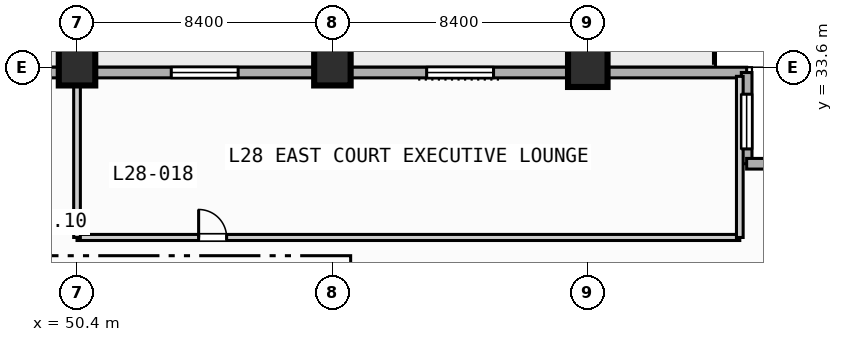
"""IFC4 building model, lengths in metres.
Left out: names, types, materials, properties, quantities, classifications, styles, units other than length and angle.
Written with IfcOpenShell. Run it as: python <this file> out.ifc"""

import sys

from ifc_helpers import new_model, si_unit, direction, frame, frame_2d, origin, origin_2d, place, context, subcontext, project, spatial, rectangle, extrude, element, fill, save


model = new_model("IFC4")
c1 = context("Model", 3, precision=1e-05, world=origin(), true_north=direction((0.0, 1.0)))
c2 = subcontext(c1, "Body", "Model", "MODEL_VIEW")
j1 = project(units=[si_unit("LENGTHUNIT", "METRE"), si_unit("PLANEANGLEUNIT", "RADIAN")], contexts=[c1])
p1 = place(None, origin())
s1 = spatial("IfcSite", under=j1, at=p1, CompositionType="ELEMENT")
p2 = place(p1, origin())
s2 = spatial("IfcBuilding", under=s1, at=p2, CompositionType="ELEMENT")
p3 = place(p2, frame((0.0, 0.0, 119.0)))
s3 = spatial("IfcBuildingStorey", under=s2, at=p3, CompositionType="ELEMENT", Elevation=119.0)
for number, where, z_axis, x_axis in (
    (1, (50.4, 33.6, 0.0), (0.0, 0.0, 1.0), (1.0, 0.0, 0.0)),
    (2, (58.8, 33.6, 0.0), (0.0, 0.0, 1.0), (1.0, 0.0, 0.0)),
):
    element("IfcColumn", number, at=place(p3, frame(where, z_axis=z_axis, x_axis=x_axis)), inside=s3, PredefinedType="COLUMN", context=c2, shape_type="SweptSolid", body=[
        extrude(rectangle(XDim=1.2, YDim=1.2, at=origin_2d()), origin(), (0.0, 0.0, 1.0), 3.8),
    ])
p4 = place(p3, frame((67.2, 33.6, 0.0), z_axis=(0.0, 0.0, 1.0), x_axis=(1.0, 0.0, 0.0)))
e3 = element("IfcColumn", 3, at=p4, inside=s3, PredefinedType="COLUMN", context=c2, shape_type="SweptSolid", body=[
    extrude(rectangle(XDim=1.3, YDim=1.3, at=origin_2d()), origin(), (0.0, 0.0, 1.0), 3.8),
])
p5 = place(p3, frame((33.425, 33.425, 0.0), z_axis=(0.0, 0.0, 1.0), x_axis=(1.0, 0.0, 0.0)))
e4 = element("IfcWall", 4, at=p5, inside=s3, PredefinedType="STANDARD", context=c2, shape_type="SweptSolid", body=[
    extrude(rectangle(XDim=39.0, YDim=0.35, at=frame_2d((19.5, 0.0))), origin(), (0.0, 0.0, 1.0), 3.55),
])
p6 = place(p5, frame((12.075, 0.0, 0.0)))
e5 = element("IfcOpeningElement", 5, at=p6, cuts=e4, PredefinedType="OPENING", context=c2, shape_type="SweptSolid", body=[
    extrude(rectangle(XDim=1.4, YDim=2.2, at=frame_2d((0.7, 1.1))), frame((0.0, 0.185, 0.0), z_axis=(0.0, -1.0, 0.0), x_axis=(1.0, 0.0, 0.0)), (0.0, 0.0, 1.0), 0.37),
])
p7 = place(p5, frame((20.075, 0.0, 0.85)))
e6 = element("IfcOpeningElement", 6, at=p7, cuts=e4, PredefinedType="OPENING", context=c2, shape_type="SweptSolid", body=[
    extrude(rectangle(XDim=2.2, YDim=1.8, at=frame_2d((1.1, 0.9))), frame((0.0, 0.185, 0.0), z_axis=(0.0, -1.0, 0.0), x_axis=(1.0, 0.0, 0.0)), (0.0, 0.0, 1.0), 0.37),
])
p8 = place(p5, frame((28.475, 0.0, 0.85)))
e7 = element("IfcOpeningElement", 7, at=p8, cuts=e4, PredefinedType="OPENING", context=c2, shape_type="SweptSolid", body=[
    extrude(rectangle(XDim=2.2, YDim=1.8, at=frame_2d((1.1, 0.9))), frame((0.0, 0.185, 0.0), z_axis=(0.0, -1.0, 0.0), x_axis=(1.0, 0.0, 0.0)), (0.0, 0.0, 1.0), 0.37),
])
p9 = place(p3, frame((72.425, 33.425, 0.0), z_axis=(0.0, 0.0, 1.0), x_axis=(0.0, -1.0, 0.0)))
e8 = element("IfcWall", 8, at=p9, inside=s3, PredefinedType="STANDARD", context=c2, shape_type="SweptSolid", body=[
    extrude(rectangle(XDim=3.0, YDim=0.35, at=frame_2d((1.5, 0.0))), origin(), (0.0, 0.0, 1.0), 3.55),
])
p10 = place(p9, frame((0.712, 0.0, 0.85)))
e9 = element("IfcOpeningElement", 9, at=p10, cuts=e8, PredefinedType="OPENING", context=c2, shape_type="SweptSolid", body=[
    extrude(rectangle(XDim=1.8, YDim=1.8, at=frame_2d((0.9, 0.9))), frame((0.0, 0.185, 0.0), z_axis=(0.0, -1.0, 0.0), x_axis=(1.0, 0.0, 0.0)), (0.0, 0.0, 1.0), 0.37),
])
p11 = place(p3, frame((72.425, 30.425, 0.0), z_axis=(0.0, 0.0, 1.0), x_axis=(1.0, 0.0, 0.0)))
e10 = element("IfcWall", 10, at=p11, inside=s3, PredefinedType="STANDARD", context=c2, shape_type="SweptSolid", body=[
    extrude(rectangle(XDim=3.0, YDim=0.35, at=frame_2d((1.5, 0.0))), origin(), (0.0, 0.0, 1.0), 3.55),
])
p12 = place(p3, frame((50.4, 28.0, 0.0), z_axis=(0.0, 0.0, 1.0), x_axis=(1.0, 0.0, 0.0)))
e11 = element("IfcWall", 11, at=p12, inside=s3, PredefinedType="PARTITIONING", context=c2, shape_type="SweptSolid", body=[
    extrude(rectangle(XDim=21.8, YDim=0.2, at=frame_2d((10.9, 0.0))), origin(), (0.0, 0.0, 1.0), 3.55),
])
p13 = place(p12, frame((4.0, 0.0, 0.0)))
e12 = element("IfcOpeningElement", 12, at=p13, cuts=e11, PredefinedType="OPENING", context=c2, shape_type="SweptSolid", body=[
    extrude(rectangle(XDim=0.92, YDim=2.1, at=frame_2d((0.46, 1.05))), frame((0.0, 0.11, 0.0), z_axis=(0.0, -1.0, 0.0), x_axis=(1.0, 0.0, 0.0)), (0.0, 0.0, 1.0), 0.22),
])
p14 = place(p3, frame((50.4, 28.0, 0.0), z_axis=(0.0, 0.0, 1.0), x_axis=(0.0, 1.0, 0.0)))
e13 = element("IfcWall", 13, at=p14, inside=s3, PredefinedType="PARTITIONING", context=c2, shape_type="SweptSolid", body=[
    extrude(rectangle(XDim=5.3, YDim=0.22, at=frame_2d((2.65, 0.0))), origin(), (0.0, 0.0, 1.0), 2.8),
])
p15 = place(p3, frame((72.2, 28.0, 0.0), z_axis=(0.0, 0.0, 1.0), x_axis=(0.0, 1.0, 0.0)))
e14 = element("IfcWall", 14, at=p15, inside=s3, PredefinedType="PARTITIONING", context=c2, shape_type="SweptSolid", body=[
    extrude(rectangle(XDim=5.3, YDim=0.22, at=frame_2d((2.65, 0.0))), origin(), (0.0, 0.0, 1.0), 3.55),
])
p16 = place(p7, origin())
e15 = element("IfcWindow", 15, at=p16, inside=s3, PartitioningType="SINGLE_PANEL", PredefinedType="WINDOW", context=c2, shape_type="SweptSolid", body=[
    extrude(rectangle(XDim=2.2, YDim=1.8, at=frame_2d((1.1, 0.9))), frame((0.0, 0.03, 0.0), z_axis=(0.0, -1.0, 0.0), x_axis=(1.0, 0.0, 0.0)), (0.0, 0.0, 1.0), 0.06),
])
fill(e6, e15)
p17 = place(p8, origin())
e16 = element("IfcWindow", 16, at=p17, inside=s3, PartitioningType="SINGLE_PANEL", PredefinedType="WINDOW", context=c2, shape_type="SweptSolid", body=[
    extrude(rectangle(XDim=2.2, YDim=1.8, at=frame_2d((1.1, 0.9))), frame((0.0, 0.03, 0.0), z_axis=(0.0, -1.0, 0.0), x_axis=(1.0, 0.0, 0.0)), (0.0, 0.0, 1.0), 0.06),
])
fill(e7, e16)
p18 = place(p10, origin())
e17 = element("IfcWindow", 17, at=p18, inside=s3, PartitioningType="SINGLE_PANEL", PredefinedType="WINDOW", context=c2, shape_type="SweptSolid", body=[
    extrude(rectangle(XDim=1.8, YDim=1.8, at=frame_2d((0.9, 0.9))), frame((0.0, 0.03, 0.0), z_axis=(0.0, -1.0, 0.0), x_axis=(1.0, 0.0, 0.0)), (0.0, 0.0, 1.0), 0.06),
])
fill(e9, e17)
p19 = place(p13, origin())
e18 = element("IfcDoor", 18, at=p19, inside=s3, OperationType="SINGLE_SWING_LEFT", PredefinedType="DOOR", context=c2, shape_type="SweptSolid", body=[
    extrude(rectangle(XDim=0.92, YDim=2.1, at=frame_2d((0.46, 1.05))), frame((0.0, 0.025, 0.0), z_axis=(0.0, -1.0, 0.0), x_axis=(1.0, 0.0, 0.0)), (0.0, 0.0, 1.0), 0.05),
])
fill(e12, e18)
save(model, sys.argv[1])
